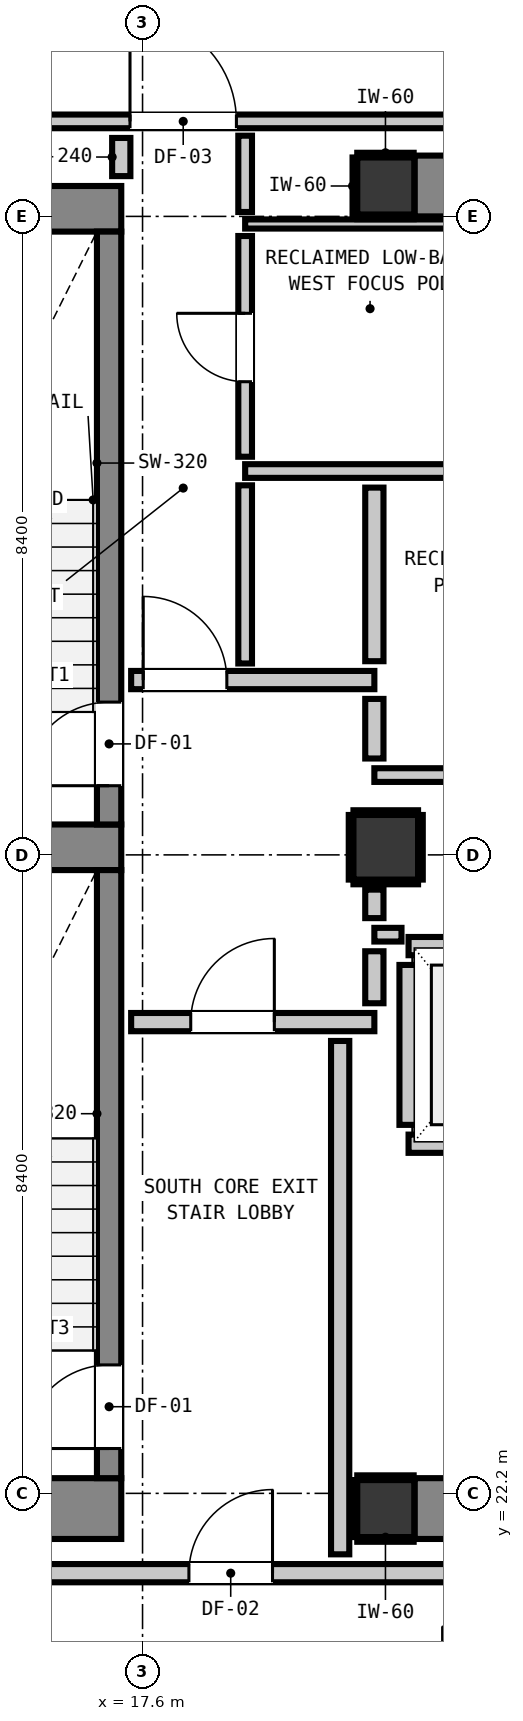
"""IFC4 building model, lengths in metres.
Left out: names, types, materials, properties, quantities, classifications, styles, units other than length and angle.
Written with IfcOpenShell. Run it as: python <this file> out.ifc"""

import sys

from ifc_helpers import new_model, si_unit, direction, frame, frame_2d, origin, origin_2d, place, context, subcontext, project, spatial, rectangle, extrude, element, fill, save


model = new_model("IFC4")
c1 = context("Model", 3, precision=1e-05, world=origin(), true_north=direction((0.0, 1.0)))
c2 = subcontext(c1, "Body", "Model", "MODEL_VIEW")
j1 = project(units=[si_unit("LENGTHUNIT", "METRE"), si_unit("PLANEANGLEUNIT", "RADIAN")], contexts=[c1])
p1 = place(None, origin())
s1 = spatial("IfcSite", under=j1, at=p1, CompositionType="ELEMENT")
p2 = place(p1, origin())
s2 = spatial("IfcBuilding", under=s1, at=p2, CompositionType="ELEMENT")
p3 = place(p2, frame((0.0, 0.0, 186.84)))
s3 = spatial("IfcBuildingStorey", under=s2, at=p3, CompositionType="ELEMENT", Elevation=186.84)
for number, where, z_axis, x_axis in (
    (1, (20.8, 22.0, 0.0), (0.0, 0.0, 1.0), (1.0, 0.0, 0.0)),
    (2, (20.8, 39.4, 0.0), (0.0, 0.0, 1.0), (1.0, 0.0, 0.0)),
):
    element("IfcColumn", number, at=place(p3, frame(where, z_axis=z_axis, x_axis=x_axis)), inside=s3, PredefinedType="COLUMN", context=c2, shape_type="SweptSolid", body=[
        extrude(rectangle(XDim=0.75, YDim=0.75, at=origin_2d()), origin(), (0.0, 0.0, 1.0), 3.32),
    ])
p4 = place(p3, frame((13.24, 22.0, 0.0), z_axis=(0.0, 0.0, 1.0), x_axis=(1.0, 0.0, 0.0)))
e3 = element("IfcWall", 3, at=p4, inside=s3, PredefinedType="SHEAR", context=c2, shape_type="SweptSolid", body=[
    extrude(rectangle(XDim=4.08, YDim=0.8, at=frame_2d((2.04, 0.0))), origin(), (0.0, 0.0, 1.0), 3.32),
])
p5 = place(p3, frame((13.24, 39.1, 0.0), z_axis=(0.0, 0.0, 1.0), x_axis=(1.0, 0.0, 0.0)))
e4 = element("IfcWall", 4, at=p5, inside=s3, PredefinedType="SHEAR", context=c2, shape_type="SweptSolid", body=[
    extrude(rectangle(XDim=4.08, YDim=0.6, at=frame_2d((2.04, 0.0))), origin(), (0.0, 0.0, 1.0), 3.32),
])
p6 = place(p3, frame((13.78, 30.7, 0.0), z_axis=(0.0, 0.0, 1.0), x_axis=(1.0, 0.0, 0.0)))
e5 = element("IfcWall", 5, at=p6, inside=s3, PredefinedType="SHEAR", context=c2, shape_type="SweptSolid", body=[
    extrude(rectangle(XDim=3.54, YDim=0.6, at=frame_2d((1.77, 0.0))), origin(), (0.0, 0.0, 1.0), 3.32),
])
for number, where, z_axis, x_axis in (
    (6, (21.18, 22.0, 0.0), (0.0, 0.0, 1.0), (1.0, 0.0, 0.0)),
    (7, (21.18, 39.4, 0.0), (0.0, 0.0, 1.0), (1.0, 0.0, 0.0)),
):
    element("IfcWall", number, at=place(p3, frame(where, z_axis=z_axis, x_axis=x_axis)), inside=s3, PredefinedType="SHEAR", context=c2, shape_type="SweptSolid", body=[
        extrude(rectangle(XDim=7.64, YDim=0.8, at=frame_2d((3.82, 0.0))), origin(), (0.0, 0.0, 1.0), 3.32),
    ])
p7 = place(p3, frame((17.16, 31.0, 0.0), z_axis=(0.0, 0.0, 1.0), x_axis=(0.0, 1.0, 0.0)))
e8 = element("IfcWall", 8, at=p7, inside=s3, PredefinedType="SHEAR", context=c2, shape_type="SweptSolid", body=[
    extrude(rectangle(XDim=7.8, YDim=0.32, at=frame_2d((3.9, 0.0))), origin(), (0.0, 0.0, 1.0), 3.32),
])
p8 = place(p7, frame((0.51, 0.0, 0.0)))
e9 = element("IfcOpeningElement", 9, at=p8, cuts=e8, PredefinedType="OPENING", context=c2, shape_type="SweptSolid", body=[
    extrude(rectangle(XDim=1.1, YDim=2.15, at=frame_2d((0.55, 1.075))), frame((0.0, 0.17, 0.0), z_axis=(0.0, -1.0, 0.0), x_axis=(1.0, 0.0, 0.0)), (0.0, 0.0, 1.0), 0.34),
])
p9 = place(p3, frame((17.16, 22.4, 0.0), z_axis=(0.0, 0.0, 1.0), x_axis=(0.0, 1.0, 0.0)))
e10 = element("IfcWall", 10, at=p9, inside=s3, PredefinedType="SHEAR", context=c2, shape_type="SweptSolid", body=[
    extrude(rectangle(XDim=8.0, YDim=0.32, at=frame_2d((4.0, 0.0))), origin(), (0.0, 0.0, 1.0), 3.32),
])
p10 = place(p9, frame((0.39, 0.0, 0.0)))
e11 = element("IfcOpeningElement", 11, at=p10, cuts=e10, PredefinedType="OPENING", context=c2, shape_type="SweptSolid", body=[
    extrude(rectangle(XDim=1.1, YDim=2.15, at=frame_2d((0.55, 1.075))), frame((0.0, 0.17, 0.0), z_axis=(0.0, -1.0, 0.0), x_axis=(1.0, 0.0, 0.0)), (0.0, 0.0, 1.0), 0.34),
])
p11 = place(p3, frame((20.8, 30.7, 0.0), z_axis=(0.0, 0.0, 1.0), x_axis=(1.0, 0.0, 0.0)))
e12 = element("IfcColumn", 12, at=p11, inside=s3, PredefinedType="COLUMN", context=c2, shape_type="SweptSolid", body=[
    extrude(rectangle(XDim=0.85, YDim=0.85, at=origin_2d()), origin(), (0.0, 0.0, 1.0), 3.32),
])
for number, where, z_axis, x_axis in (
    (13, (21.1, 26.8, 0.0), (0.0, 0.0, 1.0), (1.0, 0.0, 0.0)),
    (14, (21.1, 29.4, 0.0), (0.0, 0.0, 1.0), (1.0, 0.0, 0.0)),
):
    element("IfcWall", number, at=place(p3, frame(where, z_axis=z_axis, x_axis=x_axis)), inside=s3, PredefinedType="PARTITIONING", context=c2, shape_type="SweptSolid", body=[
        extrude(rectangle(XDim=2.2, YDim=0.24, at=frame_2d((1.1, 0.0))), origin(), (0.0, 0.0, 1.0), 2.9),
    ])
p12 = place(p3, frame((21.1, 27.048, 0.0), z_axis=(0.0, 0.0, 1.0), x_axis=(0.0, 1.0, 0.0)))
e15 = element("IfcWall", 15, at=p12, inside=s3, PredefinedType="PARTITIONING", context=c2, shape_type="SweptSolid", body=[
    extrude(rectangle(XDim=2.104, YDim=0.24, at=frame_2d((1.052, 0.0))), origin(), (0.0, 0.0, 1.0), 0.905),
])
p13 = place(p3, frame((3.207, 21.15, 0.0), z_axis=(0.0, 0.0, 1.0), x_axis=(1.0, 0.0, 0.0)))
e16 = element("IfcWall", 16, at=p13, inside=s3, PredefinedType="PARTITIONING", context=c2, shape_type="SweptSolid", body=[
    extrude(rectangle(XDim=39.386, YDim=0.24, at=frame_2d((19.693, 0.0))), origin(), (0.0, 0.0, 1.0), 2.9),
])
p14 = place(p13, frame((15.003, 0.0, 0.0)))
e17 = element("IfcOpeningElement", 17, at=p14, cuts=e16, PredefinedType="OPENING", context=c2, shape_type="SweptSolid", body=[
    extrude(rectangle(XDim=1.1, YDim=2.15, at=frame_2d((0.55, 1.075))), frame((0.0, 0.13, 0.0), z_axis=(0.0, -1.0, 0.0), x_axis=(1.0, 0.0, 0.0)), (0.0, 0.0, 1.0), 0.26),
])
p15 = place(p13, frame((4.042, 0.0, 0.0)))
e18 = element("IfcOpeningElement", 18, at=p15, cuts=e16, PredefinedType="OPENING", context=c2, shape_type="SweptSolid", body=[
    extrude(rectangle(XDim=0.9, YDim=2.1, at=frame_2d((0.45, 1.05))), frame((0.0, 0.13, 0.0), z_axis=(0.0, -1.0, 0.0), x_axis=(1.0, 0.0, 0.0)), (0.0, 0.0, 1.0), 0.26),
])
p16 = place(p13, frame((36.444, 0.0, 0.0)))
e19 = element("IfcOpeningElement", 19, at=p16, cuts=e16, PredefinedType="OPENING", context=c2, shape_type="SweptSolid", body=[
    extrude(rectangle(XDim=1.0, YDim=2.15, at=frame_2d((0.5, 1.075))), frame((0.0, 0.13, 0.0), z_axis=(0.0, -1.0, 0.0), x_axis=(1.0, 0.0, 0.0)), (0.0, 0.0, 1.0), 0.26),
])
p17 = place(p3, frame((17.45, 28.4, 0.0), z_axis=(0.0, 0.0, 1.0), x_axis=(1.0, 0.0, 0.0)))
e20 = element("IfcWall", 20, at=p17, inside=s3, PredefinedType="PARTITIONING", context=c2, shape_type="SweptSolid", body=[
    extrude(rectangle(XDim=3.2, YDim=0.24, at=frame_2d((1.6, 0.0))), origin(), (0.0, 0.0, 1.0), 2.9),
])
p18 = place(p17, frame((0.784, 0.0, 0.0)))
e21 = element("IfcOpeningElement", 21, at=p18, cuts=e20, PredefinedType="OPENING", context=c2, shape_type="SweptSolid", body=[
    extrude(rectangle(XDim=1.1, YDim=2.15, at=frame_2d((0.55, 1.075))), frame((0.0, 0.13, 0.0), z_axis=(0.0, -1.0, 0.0), x_axis=(1.0, 0.0, 0.0)), (0.0, 0.0, 1.0), 0.26),
])
p19 = place(p3, frame((17.45, 32.9, 0.0), z_axis=(0.0, 0.0, 1.0), x_axis=(1.0, 0.0, 0.0)))
e22 = element("IfcWall", 22, at=p19, inside=s3, PredefinedType="PARTITIONING", context=c2, shape_type="SweptSolid", body=[
    extrude(rectangle(XDim=3.2, YDim=0.24, at=frame_2d((1.6, 0.0))), origin(), (0.0, 0.0, 1.0), 2.9),
])
p20 = place(p19, frame((0.159, 0.0, 0.0)))
e23 = element("IfcOpeningElement", 23, at=p20, cuts=e22, PredefinedType="OPENING", context=c2, shape_type="SweptSolid", body=[
    extrude(rectangle(XDim=1.1, YDim=2.15, at=frame_2d((0.55, 1.075))), frame((0.0, 0.13, 0.0), z_axis=(0.0, -1.0, 0.0), x_axis=(1.0, 0.0, 0.0)), (0.0, 0.0, 1.0), 0.26),
])
p21 = place(p3, frame((20.65, 29.55, 0.0), z_axis=(0.0, 0.0, 1.0), x_axis=(1.0, 0.0, 0.0)))
e24 = element("IfcWall", 24, at=p21, inside=s3, PredefinedType="PARTITIONING", context=c2, shape_type="SweptSolid", body=[
    extrude(rectangle(XDim=0.357, YDim=0.18, at=frame_2d((0.179, 0.0))), origin(), (0.0, 0.0, 1.0), 2.9),
])
p22 = place(p3, frame((20.65, 31.65, 0.0), z_axis=(0.0, 0.0, 1.0), x_axis=(1.0, 0.0, 0.0)))
e25 = element("IfcWall", 25, at=p22, inside=s3, PredefinedType="PARTITIONING", context=c2, shape_type="SweptSolid", body=[
    extrude(rectangle(XDim=7.7, YDim=0.18, at=frame_2d((3.85, 0.0))), origin(), (0.0, 0.0, 1.0), 2.9),
])
p23 = place(p22, frame((1.924, 0.0, 0.0)))
e26 = element("IfcOpeningElement", 26, at=p23, cuts=e25, PredefinedType="OPENING", context=c2, shape_type="SweptSolid", body=[
    extrude(rectangle(XDim=0.9, YDim=2.1, at=frame_2d((0.45, 1.05))), frame((0.0, 0.1, 0.0), z_axis=(0.0, -1.0, 0.0), x_axis=(1.0, 0.0, 0.0)), (0.0, 0.0, 1.0), 0.2),
])
p24 = place(p3, frame((18.95, 35.65, 0.0), z_axis=(0.0, 0.0, 1.0), x_axis=(1.0, 0.0, 0.0)))
e27 = element("IfcWall", 27, at=p24, inside=s3, PredefinedType="PARTITIONING", context=c2, shape_type="SweptSolid", body=[
    extrude(rectangle(XDim=11.025, YDim=0.18, at=frame_2d((5.513, 0.0))), origin(), (0.0, 0.0, 1.0), 2.9),
])
p25 = place(p3, frame((3.207, 40.25, 0.0), z_axis=(0.0, 0.0, 1.0), x_axis=(1.0, 0.0, 0.0)))
e28 = element("IfcWall", 28, at=p25, inside=s3, PredefinedType="PARTITIONING", context=c2, shape_type="SweptSolid", body=[
    extrude(rectangle(XDim=39.386, YDim=0.18, at=frame_2d((19.693, 0.0))), origin(), (0.0, 0.0, 1.0), 2.9),
])
p26 = place(p25, frame((14.228, 0.0, 0.0)))
e29 = element("IfcOpeningElement", 29, at=p26, cuts=e28, PredefinedType="OPENING", context=c2, shape_type="SweptSolid", body=[
    extrude(rectangle(XDim=1.4, YDim=2.15, at=frame_2d((0.7, 1.075))), frame((0.0, 0.1, 0.0), z_axis=(0.0, -1.0, 0.0), x_axis=(1.0, 0.0, 0.0)), (0.0, 0.0, 1.0), 0.2),
])
p27 = place(p25, frame((1.267, 0.0, 0.0)))
e30 = element("IfcOpeningElement", 30, at=p27, cuts=e28, PredefinedType="OPENING", context=c2, shape_type="SweptSolid", body=[
    extrude(rectangle(XDim=0.9, YDim=2.1, at=frame_2d((0.45, 1.05))), frame((0.0, 0.1, 0.0), z_axis=(0.0, -1.0, 0.0), x_axis=(1.0, 0.0, 0.0)), (0.0, 0.0, 1.0), 0.2),
])
p28 = place(p25, frame((5.694, 0.0, 0.0)))
e31 = element("IfcOpeningElement", 31, at=p28, cuts=e28, PredefinedType="OPENING", context=c2, shape_type="SweptSolid", body=[
    extrude(rectangle(XDim=0.95, YDim=2.1, at=frame_2d((0.475, 1.05))), frame((0.0, 0.1, 0.0), z_axis=(0.0, -1.0, 0.0), x_axis=(1.0, 0.0, 0.0)), (0.0, 0.0, 1.0), 0.2),
])
p29 = place(p25, frame((36.494, 0.0, 0.0)))
e32 = element("IfcOpeningElement", 32, at=p29, cuts=e28, PredefinedType="OPENING", context=c2, shape_type="SweptSolid", body=[
    extrude(rectangle(XDim=0.9, YDim=2.1, at=frame_2d((0.45, 1.05))), frame((0.0, 0.1, 0.0), z_axis=(0.0, -1.0, 0.0), x_axis=(1.0, 0.0, 0.0)), (0.0, 0.0, 1.0), 0.2),
])
p30 = place(p3, frame((18.95, 38.9, 0.0), z_axis=(0.0, 0.0, 1.0), x_axis=(1.0, 0.0, 0.0)))
e33 = element("IfcWall", 33, at=p30, inside=s3, PredefinedType="PARTITIONING", context=c2, shape_type="SweptSolid", body=[
    extrude(rectangle(XDim=11.025, YDim=0.12, at=frame_2d((5.513, 0.0))), origin(), (0.0, 0.0, 1.0), 0.905),
])
p31 = place(p3, frame((17.32, 39.53, 0.0), z_axis=(0.0, 0.0, 1.0), x_axis=(0.0, 1.0, 0.0)))
e34 = element("IfcWall", 34, at=p31, inside=s3, PredefinedType="PARTITIONING", context=c2, shape_type="SweptSolid", body=[
    extrude(rectangle(XDim=0.502, YDim=0.24, at=frame_2d((0.251, 0.0))), origin(), (0.0, 0.0, 1.0), 2.9),
])
p32 = place(p3, frame((20.2, 21.398, 0.0), z_axis=(0.0, 0.0, 1.0), x_axis=(0.0, 1.0, 0.0)))
e35 = element("IfcWall", 35, at=p32, inside=s3, PredefinedType="PARTITIONING", context=c2, shape_type="SweptSolid", body=[
    extrude(rectangle(XDim=6.754, YDim=0.24, at=frame_2d((3.377, 0.0))), origin(), (0.0, 0.0, 1.0), 0.905),
])
p33 = place(p3, frame((20.65, 28.648, 0.0), z_axis=(0.0, 0.0, 1.0), x_axis=(0.0, 1.0, 0.0)))
e36 = element("IfcWall", 36, at=p33, inside=s3, PredefinedType="PARTITIONING", context=c2, shape_type="SweptSolid", body=[
    extrude(rectangle(XDim=0.684, YDim=0.24, at=frame_2d((0.342, 0.0))), origin(), (0.0, 0.0, 1.0), 0.905),
])
p34 = place(p3, frame((20.65, 29.768, 0.0), z_axis=(0.0, 0.0, 1.0), x_axis=(0.0, 1.0, 0.0)))
e37 = element("IfcWall", 37, at=p34, inside=s3, PredefinedType="PARTITIONING", context=c2, shape_type="SweptSolid", body=[
    extrude(rectangle(XDim=0.375, YDim=0.24, at=frame_2d((0.188, 0.0))), origin(), (0.0, 0.0, 1.0), 0.905),
])
p35 = place(p3, frame((20.65, 31.868, 0.0), z_axis=(0.0, 0.0, 1.0), x_axis=(0.0, 1.0, 0.0)))
e38 = element("IfcWall", 38, at=p35, inside=s3, PredefinedType="PARTITIONING", context=c2, shape_type="SweptSolid", body=[
    extrude(rectangle(XDim=0.784, YDim=0.24, at=frame_2d((0.392, 0.0))), origin(), (0.0, 0.0, 1.0), 0.905),
])
p36 = place(p3, frame((20.65, 33.148, 0.0), z_axis=(0.0, 0.0, 1.0), x_axis=(0.0, 1.0, 0.0)))
e39 = element("IfcWall", 39, at=p36, inside=s3, PredefinedType="PARTITIONING", context=c2, shape_type="SweptSolid", body=[
    extrude(rectangle(XDim=2.284, YDim=0.24, at=frame_2d((1.142, 0.0))), origin(), (0.0, 0.0, 1.0), 0.905),
])
p37 = place(p3, frame((18.95, 33.118, 0.0), z_axis=(0.0, 0.0, 1.0), x_axis=(0.0, 1.0, 0.0)))
e40 = element("IfcWall", 40, at=p37, inside=s3, PredefinedType="PARTITIONING", context=c2, shape_type="SweptSolid", body=[
    extrude(rectangle(XDim=2.344, YDim=0.18, at=frame_2d((1.172, 0.0))), origin(), (0.0, 0.0, 1.0), 2.9),
])
p38 = place(p3, frame((18.95, 35.838, 0.0), z_axis=(0.0, 0.0, 1.0), x_axis=(0.0, 1.0, 0.0)))
e41 = element("IfcWall", 41, at=p38, inside=s3, PredefinedType="PARTITIONING", context=c2, shape_type="SweptSolid", body=[
    extrude(rectangle(XDim=2.904, YDim=0.18, at=frame_2d((1.452, 0.0))), origin(), (0.0, 0.0, 1.0), 2.9),
])
p39 = place(p38, frame((0.987, 0.0, 0.0)))
e42 = element("IfcOpeningElement", 42, at=p39, cuts=e41, PredefinedType="OPENING", context=c2, shape_type="SweptSolid", body=[
    extrude(rectangle(XDim=0.9, YDim=2.1, at=frame_2d((0.45, 1.05))), frame((0.0, 0.1, 0.0), z_axis=(0.0, -1.0, 0.0), x_axis=(1.0, 0.0, 0.0)), (0.0, 0.0, 1.0), 0.2),
])
p40 = place(p3, frame((18.95, 39.058, 0.0), z_axis=(0.0, 0.0, 1.0), x_axis=(0.0, 1.0, 0.0)))
e43 = element("IfcWall", 43, at=p40, inside=s3, PredefinedType="PARTITIONING", context=c2, shape_type="SweptSolid", body=[
    extrude(rectangle(XDim=1.004, YDim=0.18, at=frame_2d((0.502, 0.0))), origin(), (0.0, 0.0, 1.0), 2.9),
])
for number, where, z_axis, x_axis in (
    (44, (20.425, 21.593, 0.0), (0.0, 0.0, 1.0), (1.0, 0.0, 0.0)),
    (45, (20.425, 22.407, 0.0), (0.0, 0.0, 1.0), (1.0, 0.0, 0.0)),
):
    element("IfcWall", number, at=place(p3, frame(where, z_axis=z_axis, x_axis=x_axis)), inside=s3, PredefinedType="PARTITIONING", context=c2, shape_type="SweptSolid", body=[
        extrude(rectangle(XDim=0.742, YDim=0.06, at=frame_2d((0.371, 0.0))), origin(), (0.0, 0.0, 1.0), 0.905),
    ])
p41 = place(p3, frame((20.393, 21.625, 0.0), z_axis=(0.0, 0.0, 1.0), x_axis=(0.0, 1.0, 0.0)))
e46 = element("IfcWall", 46, at=p41, inside=s3, PredefinedType="PARTITIONING", context=c2, shape_type="SweptSolid", body=[
    extrude(rectangle(XDim=0.75, YDim=0.06, at=frame_2d((0.375, 0.0))), origin(), (0.0, 0.0, 1.0), 0.905),
])
for number, where, z_axis, x_axis in (
    (47, (20.425, 38.993, 0.0), (0.0, 0.0, 1.0), (1.0, 0.0, 0.0)),
    (48, (20.425, 39.807, 0.0), (0.0, 0.0, 1.0), (1.0, 0.0, 0.0)),
):
    element("IfcWall", number, at=place(p3, frame(where, z_axis=z_axis, x_axis=x_axis)), inside=s3, PredefinedType="PARTITIONING", context=c2, shape_type="SweptSolid", body=[
        extrude(rectangle(XDim=0.742, YDim=0.06, at=frame_2d((0.371, 0.0))), origin(), (0.0, 0.0, 1.0), 0.905),
    ])
p42 = place(p3, frame((20.393, 39.025, 0.0), z_axis=(0.0, 0.0, 1.0), x_axis=(0.0, 1.0, 0.0)))
e49 = element("IfcWall", 49, at=p42, inside=s3, PredefinedType="PARTITIONING", context=c2, shape_type="SweptSolid", body=[
    extrude(rectangle(XDim=0.75, YDim=0.06, at=frame_2d((0.375, 0.0))), origin(), (0.0, 0.0, 1.0), 0.905),
])
for number, where, z_axis, x_axis in (
    (50, (20.375, 30.243, 0.0), (0.0, 0.0, 1.0), (1.0, 0.0, 0.0)),
    (51, (20.375, 31.157, 0.0), (0.0, 0.0, 1.0), (1.0, 0.0, 0.0)),
    (52, (20.343, 30.275, 0.0), (0.0, 0.0, 1.0), (0.0, 1.0, 0.0)),
    (53, (21.257, 30.275, 0.0), (0.0, 0.0, 1.0), (0.0, 1.0, 0.0)),
):
    element("IfcWall", number, at=place(p3, frame(where, z_axis=z_axis, x_axis=x_axis)), inside=s3, PredefinedType="PARTITIONING", context=c2, shape_type="SweptSolid", body=[
        extrude(rectangle(XDim=0.85, YDim=0.06, at=frame_2d((0.425, 0.0))), origin(), (0.0, 0.0, 1.0), 0.905),
    ])
p43 = place(p8, origin())
e54 = element("IfcDoor", 54, at=p43, inside=s3, OperationType="SINGLE_SWING_LEFT", PredefinedType="DOOR", context=c2, shape_type="SweptSolid", body=[
    extrude(rectangle(XDim=1.1, YDim=2.15, at=frame_2d((0.55, 1.075))), frame((0.0, 0.025, 0.0), z_axis=(0.0, -1.0, 0.0), x_axis=(1.0, 0.0, 0.0)), (0.0, 0.0, 1.0), 0.05),
])
fill(e9, e54)
p44 = place(p10, origin())
e55 = element("IfcDoor", 55, at=p44, inside=s3, OperationType="SINGLE_SWING_LEFT", PredefinedType="DOOR", context=c2, shape_type="SweptSolid", body=[
    extrude(rectangle(XDim=1.1, YDim=2.15, at=frame_2d((0.55, 1.075))), frame((0.0, 0.025, 0.0), z_axis=(0.0, -1.0, 0.0), x_axis=(1.0, 0.0, 0.0)), (0.0, 0.0, 1.0), 0.05),
])
fill(e11, e55)
p45 = place(p18, origin())
e56 = element("IfcDoor", 56, at=p45, inside=s3, OperationType="SINGLE_SWING_RIGHT", PredefinedType="DOOR", context=c2, shape_type="SweptSolid", body=[
    extrude(rectangle(XDim=1.1, YDim=2.15, at=frame_2d((0.55, 1.075))), frame((0.0, 0.025, 0.0), z_axis=(0.0, -1.0, 0.0), x_axis=(1.0, 0.0, 0.0)), (0.0, 0.0, 1.0), 0.05),
])
fill(e21, e56)
p46 = place(p20, origin())
e57 = element("IfcDoor", 57, at=p46, inside=s3, OperationType="SINGLE_SWING_LEFT", PredefinedType="DOOR", context=c2, shape_type="SweptSolid", body=[
    extrude(rectangle(XDim=1.1, YDim=2.15, at=frame_2d((0.55, 1.075))), frame((0.0, 0.025, 0.0), z_axis=(0.0, -1.0, 0.0), x_axis=(1.0, 0.0, 0.0)), (0.0, 0.0, 1.0), 0.05),
])
fill(e23, e57)
p47 = place(p14, origin())
e58 = element("IfcDoor", 58, at=p47, inside=s3, OperationType="SINGLE_SWING_RIGHT", PredefinedType="DOOR", context=c2, shape_type="SweptSolid", body=[
    extrude(rectangle(XDim=1.1, YDim=2.15, at=frame_2d((0.55, 1.075))), frame((0.0, 0.025, 0.0), z_axis=(0.0, -1.0, 0.0), x_axis=(1.0, 0.0, 0.0)), (0.0, 0.0, 1.0), 0.05),
])
fill(e17, e58)
p48 = place(p26, origin())
e59 = element("IfcDoor", 59, at=p48, inside=s3, OperationType="SINGLE_SWING_LEFT", PredefinedType="DOOR", context=c2, shape_type="SweptSolid", body=[
    extrude(rectangle(XDim=1.4, YDim=2.15, at=frame_2d((0.7, 1.075))), frame((0.0, 0.025, 0.0), z_axis=(0.0, -1.0, 0.0), x_axis=(1.0, 0.0, 0.0)), (0.0, 0.0, 1.0), 0.05),
])
fill(e29, e59)
p49 = place(p39, origin())
e60 = element("IfcDoor", 60, at=p49, inside=s3, OperationType="SINGLE_SWING_RIGHT", PredefinedType="DOOR", context=c2, shape_type="SweptSolid", body=[
    extrude(rectangle(XDim=0.9, YDim=2.1, at=frame_2d((0.45, 1.05))), frame((0.0, 0.025, 0.0), z_axis=(0.0, -1.0, 0.0), x_axis=(1.0, 0.0, 0.0)), (0.0, 0.0, 1.0), 0.05),
])
fill(e42, e60)
save(model, sys.argv[1])
